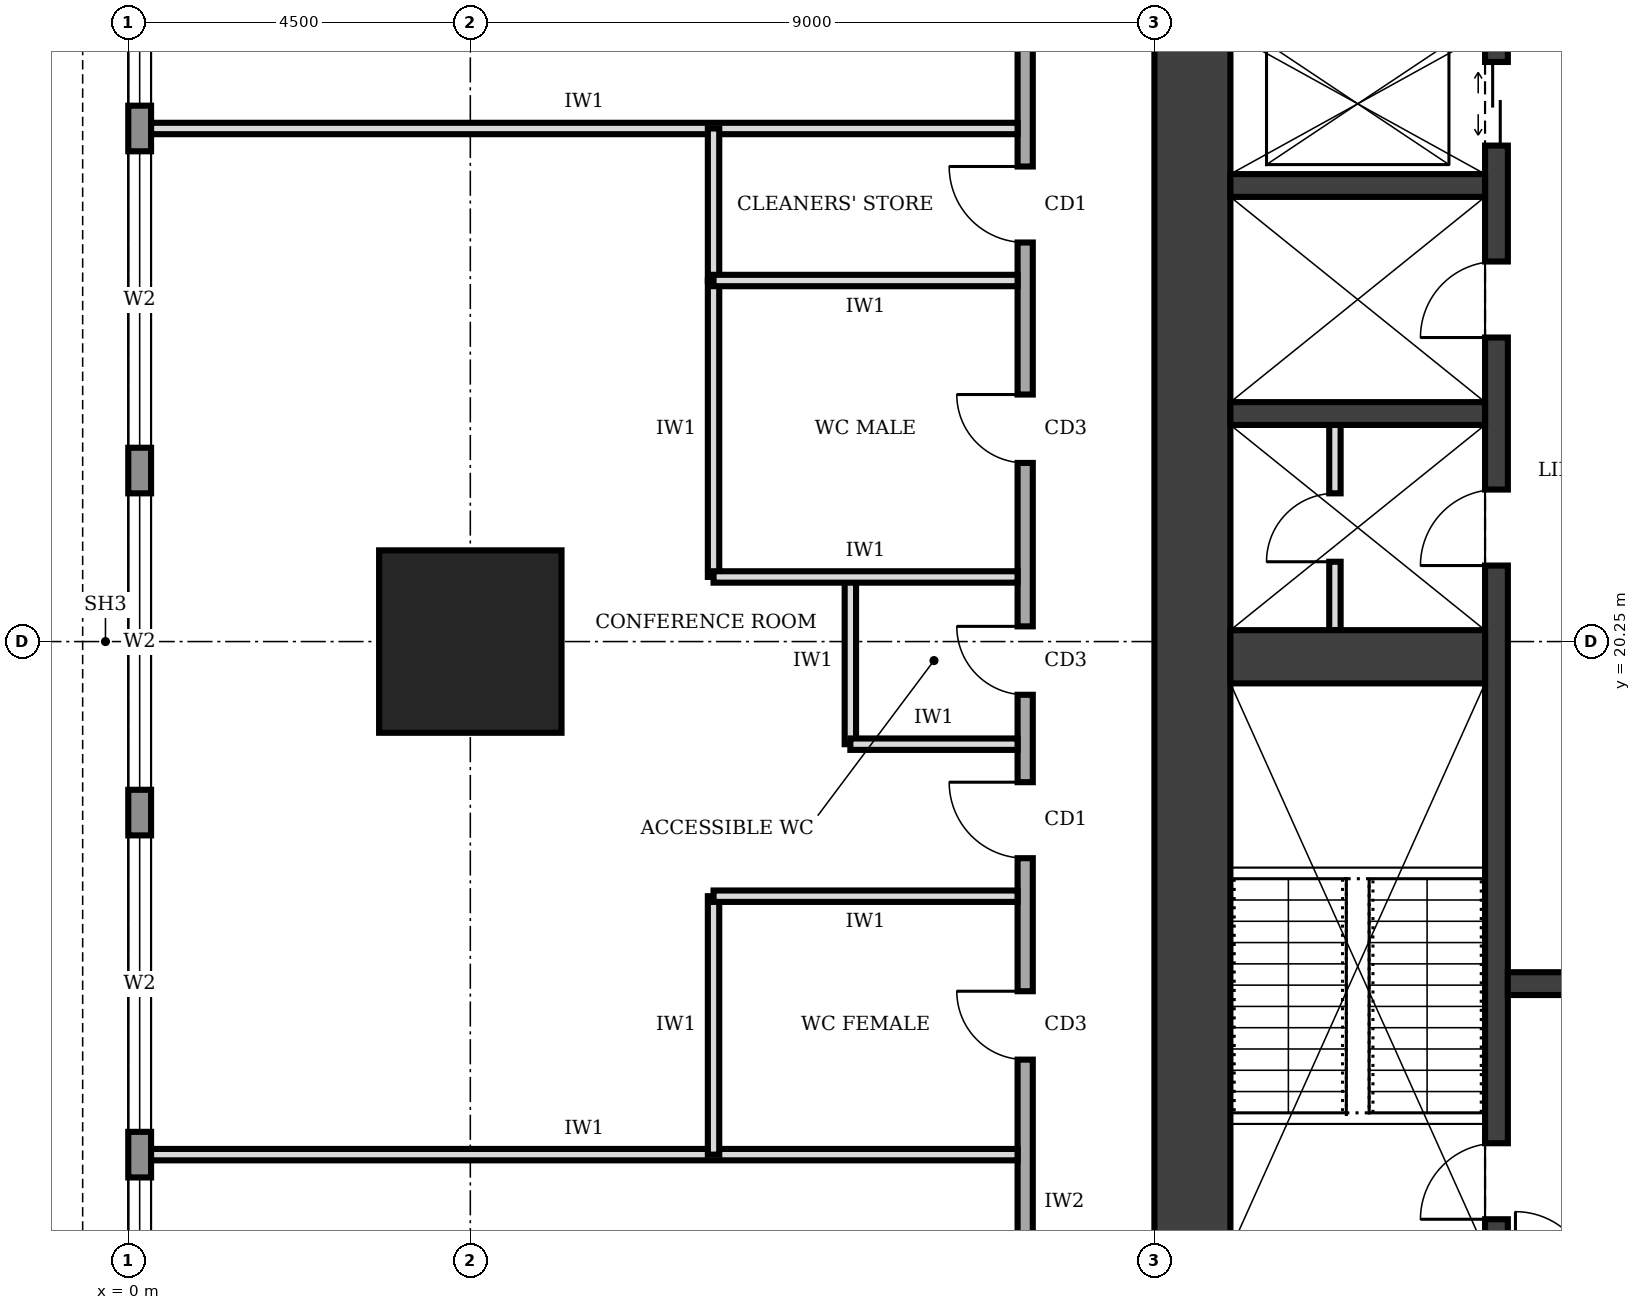
"""IFC4 building model, lengths in metres.
Left out: names, types, materials, properties, quantities, classifications, styles, units other than length and angle.
Written with IfcOpenShell. Run it as: python <this file> out.ifc"""

import sys

from ifc_helpers import new_model, si_unit, direction, frame, frame_2d, origin, origin_2d, place, context, subcontext, project, spatial, rectangle, extrude, element, fill, save


model = new_model("IFC4")
c1 = context("Model", 3, precision=1e-05, world=origin(), true_north=direction((0.0, 1.0)))
c2 = subcontext(c1, "Body", "Model", "MODEL_VIEW")
j1 = project(units=[si_unit("LENGTHUNIT", "METRE"), si_unit("PLANEANGLEUNIT", "RADIAN")], contexts=[c1])
p1 = place(None, origin())
s1 = spatial("IfcSite", under=j1, at=p1, CompositionType="ELEMENT")
p2 = place(p1, origin())
s2 = spatial("IfcBuilding", under=s1, at=p2, CompositionType="ELEMENT")
p3 = place(p2, frame((0.0, 0.0, 149.0)))
s3 = spatial("IfcBuildingStorey", under=s2, at=p3, CompositionType="ELEMENT", Elevation=149.0)
p4 = place(p3, frame((14.0, 28.25, 0.0), z_axis=(0.0, 0.0, 1.0), x_axis=(0.0, -1.0, 0.0)))
e1 = element("IfcWall", 1, at=p4, inside=s3, PredefinedType="SHEAR", context=c2, shape_type="SweptSolid", body=[
    extrude(rectangle(XDim=16.0, YDim=1.0, at=frame_2d((8.0, 0.0))), origin(), (0.0, 0.0, 1.0), 4.0),
])
p5 = place(p3, frame((18.0, 12.25, 0.0), z_axis=(0.0, 0.0, 1.0), x_axis=(0.0, 1.0, 0.0)))
e2 = element("IfcWall", 2, at=p5, inside=s3, PredefinedType="SHEAR", context=c2, shape_type="SweptSolid", body=[
    extrude(rectangle(XDim=16.0, YDim=0.3, at=frame_2d((8.0, 0.0))), origin(), (0.0, 0.0, 1.0), 4.0),
])
p6 = place(p5, frame((0.4, 0.0, 0.0)))
e3 = element("IfcOpeningElement", 3, at=p6, cuts=e2, PredefinedType="OPENING", context=c2, shape_type="SweptSolid", body=[
    extrude(rectangle(XDim=1.0, YDim=2.1, at=frame_2d((0.5, 1.05))), frame((0.0, 0.16, 0.0), z_axis=(0.0, -1.0, 0.0), x_axis=(1.0, 0.0, 0.0)), (0.0, 0.0, 1.0), 0.32),
])
p7 = place(p5, frame((14.525, 0.0, 0.0)))
e4 = element("IfcOpeningElement", 4, at=p7, cuts=e2, PredefinedType="OPENING", context=c2, shape_type="SweptSolid", body=[
    extrude(rectangle(XDim=1.1, YDim=2.1, at=frame_2d((0.55, 1.05))), frame((0.0, 0.16, 0.0), z_axis=(0.0, -1.0, 0.0), x_axis=(1.0, 0.0, 0.0)), (0.0, 0.0, 1.0), 0.32),
])
p8 = place(p5, frame((9.0, 0.0, 0.0)))
e5 = element("IfcOpeningElement", 5, at=p8, cuts=e2, PredefinedType="OPENING", context=c2, shape_type="SweptSolid", body=[
    extrude(rectangle(XDim=1.0, YDim=2.1, at=frame_2d((0.5, 1.05))), frame((0.0, 0.16, 0.0), z_axis=(0.0, -1.0, 0.0), x_axis=(1.0, 0.0, 0.0)), (0.0, 0.0, 1.0), 0.32),
])
p9 = place(p5, frame((12.0, 0.0, 0.0)))
e6 = element("IfcOpeningElement", 6, at=p9, cuts=e2, PredefinedType="OPENING", context=c2, shape_type="SweptSolid", body=[
    extrude(rectangle(XDim=1.0, YDim=2.1, at=frame_2d((0.5, 1.05))), frame((0.0, 0.16, 0.0), z_axis=(0.0, -1.0, 0.0), x_axis=(1.0, 0.0, 0.0)), (0.0, 0.0, 1.0), 0.32),
])
p10 = place(p3, frame((14.5, 20.05, 0.0), z_axis=(0.0, 0.0, 1.0), x_axis=(1.0, 0.0, 0.0)))
e7 = element("IfcWall", 7, at=p10, inside=s3, PredefinedType="SHEAR", context=c2, shape_type="SweptSolid", body=[
    extrude(rectangle(XDim=3.35, YDim=0.7, at=frame_2d((1.675, 0.0))), origin(), (0.0, 0.0, 1.0), 4.0),
])
p11 = place(p3, frame((18.15, 15.75, 0.0), z_axis=(0.0, 0.0, 1.0), x_axis=(1.0, 0.0, 0.0)))
e8 = element("IfcWall", 8, at=p11, inside=s3, PredefinedType="SHEAR", context=c2, shape_type="SweptSolid", body=[
    extrude(rectangle(XDim=4.2, YDim=0.3, at=frame_2d((2.1, 0.0))), origin(), (0.0, 0.0, 1.0), 4.0),
])
p12 = place(p11, frame((1.6, 0.0, 0.0)))
e9 = element("IfcOpeningElement", 9, at=p12, cuts=e8, PredefinedType="OPENING", context=c2, shape_type="SweptSolid", body=[
    extrude(rectangle(XDim=1.0, YDim=2.1, at=frame_2d((0.5, 1.05))), frame((0.0, 0.16, 0.0), z_axis=(0.0, -1.0, 0.0), x_axis=(1.0, 0.0, 0.0)), (0.0, 0.0, 1.0), 0.32),
])
for number, where, z_axis, x_axis in (
    (10, (14.5, 23.25, 0.0), (0.0, 0.0, 1.0), (1.0, 0.0, 0.0)),
    (11, (14.5, 26.25, 0.0), (0.0, 0.0, 1.0), (1.0, 0.0, 0.0)),
):
    element("IfcWall", number, at=place(p3, frame(where, z_axis=z_axis, x_axis=x_axis)), inside=s3, PredefinedType="SHEAR", context=c2, shape_type="SweptSolid", body=[
        extrude(rectangle(XDim=3.35, YDim=0.3, at=frame_2d((1.675, 0.0))), origin(), (0.0, 0.0, 1.0), 4.0),
    ])
p13 = place(p3, frame((4.5, 20.25, 0.0), z_axis=(0.0, 0.0, 1.0), x_axis=(1.0, 0.0, 0.0)))
e12 = element("IfcColumn", 12, at=p13, inside=s3, PredefinedType="COLUMN", context=c2, shape_type="SweptSolid", body=[
    extrude(rectangle(XDim=2.4, YDim=2.4, at=origin_2d()), origin(), (0.0, 0.0, 1.0), 4.0),
])
p14 = place(p3, frame((0.15, 35.98, 0.0), z_axis=(0.0, 0.0, 1.0), x_axis=(0.0, -1.0, 0.0)))
e13 = element("IfcWall", 13, at=p14, inside=s3, PredefinedType="STANDARD", context=c2, shape_type="SweptSolid", body=[
    extrude(rectangle(XDim=31.46, YDim=0.3, at=frame_2d((15.73, 0.0))), origin(), (0.0, 0.0, 1.0), 3.75),
])
p15 = place(p14, frame((27.28, 0.0, 0.6)))
e14 = element("IfcOpeningElement", 14, at=p15, cuts=e13, PredefinedType="OPENING", context=c2, shape_type="SweptSolid", body=[
    extrude(rectangle(XDim=3.9, YDim=2.6, at=frame_2d((1.95, 1.3))), frame((0.0, 0.16, 0.0), z_axis=(0.0, -1.0, 0.0), x_axis=(1.0, 0.0, 0.0)), (0.0, 0.0, 1.0), 0.32),
])
p16 = place(p14, frame((22.78, 0.0, 0.6)))
e15 = element("IfcOpeningElement", 15, at=p16, cuts=e13, PredefinedType="OPENING", context=c2, shape_type="SweptSolid", body=[
    extrude(rectangle(XDim=3.9, YDim=2.6, at=frame_2d((1.95, 1.3))), frame((0.0, 0.16, 0.0), z_axis=(0.0, -1.0, 0.0), x_axis=(1.0, 0.0, 0.0)), (0.0, 0.0, 1.0), 0.32),
])
p17 = place(p14, frame((18.28, 0.0, 0.6)))
e16 = element("IfcOpeningElement", 16, at=p17, cuts=e13, PredefinedType="OPENING", context=c2, shape_type="SweptSolid", body=[
    extrude(rectangle(XDim=3.9, YDim=2.6, at=frame_2d((1.95, 1.3))), frame((0.0, 0.16, 0.0), z_axis=(0.0, -1.0, 0.0), x_axis=(1.0, 0.0, 0.0)), (0.0, 0.0, 1.0), 0.32),
])
p18 = place(p14, frame((13.78, 0.0, 0.6)))
e17 = element("IfcOpeningElement", 17, at=p18, cuts=e13, PredefinedType="OPENING", context=c2, shape_type="SweptSolid", body=[
    extrude(rectangle(XDim=3.9, YDim=2.6, at=frame_2d((1.95, 1.3))), frame((0.0, 0.16, 0.0), z_axis=(0.0, -1.0, 0.0), x_axis=(1.0, 0.0, 0.0)), (0.0, 0.0, 1.0), 0.32),
])
p19 = place(p14, frame((9.28, 0.0, 0.6)))
e18 = element("IfcOpeningElement", 18, at=p19, cuts=e13, PredefinedType="OPENING", context=c2, shape_type="SweptSolid", body=[
    extrude(rectangle(XDim=3.9, YDim=2.6, at=frame_2d((1.95, 1.3))), frame((0.0, 0.16, 0.0), z_axis=(0.0, -1.0, 0.0), x_axis=(1.0, 0.0, 0.0)), (0.0, 0.0, 1.0), 0.32),
])
p20 = place(p14, frame((4.78, 0.0, 0.6)))
e19 = element("IfcOpeningElement", 19, at=p20, cuts=e13, PredefinedType="OPENING", context=c2, shape_type="SweptSolid", body=[
    extrude(rectangle(XDim=3.9, YDim=2.6, at=frame_2d((1.95, 1.3))), frame((0.0, 0.16, 0.0), z_axis=(0.0, -1.0, 0.0), x_axis=(1.0, 0.0, 0.0)), (0.0, 0.0, 1.0), 0.32),
])
p21 = place(p3, frame((15.875, 20.4, 0.0), z_axis=(0.0, 0.0, 1.0), x_axis=(0.0, 1.0, 0.0)))
e20 = element("IfcWall", 20, at=p21, inside=s3, PredefinedType="PARTITIONING", context=c2, shape_type="SweptSolid", body=[
    extrude(rectangle(XDim=2.7, YDim=0.15, at=frame_2d((1.35, 0.0))), origin(), (0.0, 0.0, 1.0), 3.75),
])
p22 = place(p21, frame((0.9, 0.0, 0.0)))
e21 = element("IfcOpeningElement", 21, at=p22, cuts=e20, PredefinedType="OPENING", context=c2, shape_type="SweptSolid", body=[
    extrude(rectangle(XDim=0.9, YDim=2.1, at=frame_2d((0.45, 1.05))), frame((0.0, 0.085, 0.0), z_axis=(0.0, -1.0, 0.0), x_axis=(1.0, 0.0, 0.0)), (0.0, 0.0, 1.0), 0.17),
])
p23 = place(p3, frame((11.8, 32.8, 0.0), z_axis=(0.0, 0.0, 1.0), x_axis=(0.0, -1.0, 0.0)))
e22 = element("IfcWall", 22, at=p23, inside=s3, PredefinedType="SOLIDWALL", context=c2, shape_type="SweptSolid", body=[
    extrude(rectangle(XDim=25.3, YDim=0.2, at=frame_2d((12.65, 0.0))), origin(), (0.0, 0.0, 1.0), 3.75),
])
p24 = place(p23, frame((21.8, 0.0, 0.0)))
e23 = element("IfcOpeningElement", 23, at=p24, cuts=e22, PredefinedType="OPENING", context=c2, shape_type="SweptSolid", body=[
    extrude(rectangle(XDim=1.0, YDim=2.1, at=frame_2d((0.5, 1.05))), frame((0.0, 0.11, 0.0), z_axis=(0.0, -1.0, 0.0), x_axis=(1.0, 0.0, 0.0)), (0.0, 0.0, 1.0), 0.22),
])
p25 = place(p23, frame((17.15, 0.0, 0.0)))
e24 = element("IfcOpeningElement", 24, at=p25, cuts=e22, PredefinedType="OPENING", context=c2, shape_type="SweptSolid", body=[
    extrude(rectangle(XDim=0.9, YDim=2.1, at=frame_2d((0.45, 1.05))), frame((0.0, 0.11, 0.0), z_axis=(0.0, -1.0, 0.0), x_axis=(1.0, 0.0, 0.0)), (0.0, 0.0, 1.0), 0.22),
])
p26 = place(p23, frame((12.35, 0.0, 0.0)))
e25 = element("IfcOpeningElement", 25, at=p26, cuts=e22, PredefinedType="OPENING", context=c2, shape_type="SweptSolid", body=[
    extrude(rectangle(XDim=0.9, YDim=2.1, at=frame_2d((0.45, 1.05))), frame((0.0, 0.11, 0.0), z_axis=(0.0, -1.0, 0.0), x_axis=(1.0, 0.0, 0.0)), (0.0, 0.0, 1.0), 0.22),
])
p27 = place(p23, frame((9.3, 0.0, 0.0)))
e26 = element("IfcOpeningElement", 26, at=p27, cuts=e22, PredefinedType="OPENING", context=c2, shape_type="SweptSolid", body=[
    extrude(rectangle(XDim=0.9, YDim=2.1, at=frame_2d((0.45, 1.05))), frame((0.0, 0.11, 0.0), z_axis=(0.0, -1.0, 0.0), x_axis=(1.0, 0.0, 0.0)), (0.0, 0.0, 1.0), 0.22),
])
p28 = place(p23, frame((6.3, 0.0, 0.0)))
e27 = element("IfcOpeningElement", 27, at=p28, cuts=e22, PredefinedType="OPENING", context=c2, shape_type="SweptSolid", body=[
    extrude(rectangle(XDim=1.0, YDim=2.1, at=frame_2d((0.5, 1.05))), frame((0.0, 0.11, 0.0), z_axis=(0.0, -1.0, 0.0), x_axis=(1.0, 0.0, 0.0)), (0.0, 0.0, 1.0), 0.22),
])
p29 = place(p23, frame((14.4, 0.0, 0.0)))
e28 = element("IfcOpeningElement", 28, at=p29, cuts=e22, PredefinedType="OPENING", context=c2, shape_type="SweptSolid", body=[
    extrude(rectangle(XDim=1.0, YDim=2.1, at=frame_2d((0.5, 1.05))), frame((0.0, 0.11, 0.0), z_axis=(0.0, -1.0, 0.0), x_axis=(1.0, 0.0, 0.0)), (0.0, 0.0, 1.0), 0.22),
])
p30 = place(p23, frame((2.3, 0.0, 0.0)))
e29 = element("IfcOpeningElement", 29, at=p30, cuts=e22, PredefinedType="OPENING", context=c2, shape_type="SweptSolid", body=[
    extrude(rectangle(XDim=1.0, YDim=2.1, at=frame_2d((0.5, 1.05))), frame((0.0, 0.11, 0.0), z_axis=(0.0, -1.0, 0.0), x_axis=(1.0, 0.0, 0.0)), (0.0, 0.0, 1.0), 0.22),
])
for number, where, z_axis, x_axis in (
    (30, (0.3, 13.5, 0.0), (0.0, 0.0, 1.0), (1.0, 0.0, 0.0)),
    (31, (0.3, 27.0, 0.0), (0.0, 0.0, 1.0), (1.0, 0.0, 0.0)),
):
    element("IfcWall", number, at=place(p3, frame(where, z_axis=z_axis, x_axis=x_axis)), inside=s3, PredefinedType="PARTITIONING", context=c2, shape_type="SweptSolid", body=[
        extrude(rectangle(XDim=11.4, YDim=0.15, at=frame_2d((5.7, 0.0))), origin(), (0.0, 0.0, 1.0), 3.75),
    ])
p31 = place(p3, frame((11.7, 16.9, 0.0), z_axis=(0.0, 0.0, 1.0), x_axis=(-1.0, 0.0, 0.0)))
e32 = element("IfcWall", 32, at=p31, inside=s3, PredefinedType="PARTITIONING", context=c2, shape_type="SweptSolid", body=[
    extrude(rectangle(XDim=4.0, YDim=0.15, at=frame_2d((2.0, 0.0))), origin(), (0.0, 0.0, 1.0), 3.75),
])
p32 = place(p3, frame((11.7, 18.9, 0.0), z_axis=(0.0, 0.0, 1.0), x_axis=(-1.0, 0.0, 0.0)))
e33 = element("IfcWall", 33, at=p32, inside=s3, PredefinedType="PARTITIONING", context=c2, shape_type="SweptSolid", body=[
    extrude(rectangle(XDim=2.2, YDim=0.15, at=frame_2d((1.1, 0.0))), origin(), (0.0, 0.0, 1.0), 3.75),
])
p33 = place(p3, frame((11.7, 21.1, 0.0), z_axis=(0.0, 0.0, 1.0), x_axis=(-1.0, 0.0, 0.0)))
e34 = element("IfcWall", 34, at=p33, inside=s3, PredefinedType="PARTITIONING", context=c2, shape_type="SweptSolid", body=[
    extrude(rectangle(XDim=4.0, YDim=0.15, at=frame_2d((2.0, 0.0))), origin(), (0.0, 0.0, 1.0), 2.85),
])
p34 = place(p3, frame((11.7, 25.0, 0.0), z_axis=(0.0, 0.0, 1.0), x_axis=(-1.0, 0.0, 0.0)))
e35 = element("IfcWall", 35, at=p34, inside=s3, PredefinedType="PARTITIONING", context=c2, shape_type="SweptSolid", body=[
    extrude(rectangle(XDim=4.0, YDim=0.15, at=frame_2d((2.0, 0.0))), origin(), (0.0, 0.0, 1.0), 3.75),
])
p35 = place(p3, frame((7.7, 13.5, 0.0), z_axis=(0.0, 0.0, 1.0), x_axis=(0.0, 1.0, 0.0)))
e36 = element("IfcWall", 36, at=p35, inside=s3, PredefinedType="PARTITIONING", context=c2, shape_type="SweptSolid", body=[
    extrude(rectangle(XDim=3.4, YDim=0.15, at=frame_2d((1.7, 0.0))), origin(), (0.0, 0.0, 1.0), 3.75),
])
p36 = place(p3, frame((9.5, 18.9, 0.0), z_axis=(0.0, 0.0, 1.0), x_axis=(0.0, 1.0, 0.0)))
e37 = element("IfcWall", 37, at=p36, inside=s3, PredefinedType="PARTITIONING", context=c2, shape_type="SweptSolid", body=[
    extrude(rectangle(XDim=2.2, YDim=0.15, at=frame_2d((1.1, 0.0))), origin(), (0.0, 0.0, 1.0), 3.75),
])
p37 = place(p3, frame((7.7, 21.1, 0.0), z_axis=(0.0, 0.0, 1.0), x_axis=(0.0, 1.0, 0.0)))
e38 = element("IfcWall", 38, at=p37, inside=s3, PredefinedType="PARTITIONING", context=c2, shape_type="SweptSolid", body=[
    extrude(rectangle(XDim=3.9, YDim=0.15, at=frame_2d((1.95, 0.0))), origin(), (0.0, 0.0, 1.0), 3.75),
])
p38 = place(p3, frame((7.7, 25.0, 0.0), z_axis=(0.0, 0.0, 1.0), x_axis=(0.0, 1.0, 0.0)))
e39 = element("IfcWall", 39, at=p38, inside=s3, PredefinedType="PARTITIONING", context=c2, shape_type="SweptSolid", body=[
    extrude(rectangle(XDim=2.0, YDim=0.15, at=frame_2d((1.0, 0.0))), origin(), (0.0, 0.0, 1.0), 3.75),
])
p39 = place(p16, origin())
e40 = element("IfcWindow", 40, at=p39, inside=s3, PartitioningType="SINGLE_PANEL", PredefinedType="WINDOW", context=c2, shape_type="SweptSolid", body=[
    extrude(rectangle(XDim=3.9, YDim=2.6, at=frame_2d((1.95, 1.3))), frame((0.0, 0.03, 0.0), z_axis=(0.0, -1.0, 0.0), x_axis=(1.0, 0.0, 0.0)), (0.0, 0.0, 1.0), 0.06),
])
fill(e15, e40)
p40 = place(p17, origin())
e41 = element("IfcWindow", 41, at=p40, inside=s3, PartitioningType="SINGLE_PANEL", PredefinedType="WINDOW", context=c2, shape_type="SweptSolid", body=[
    extrude(rectangle(XDim=3.9, YDim=2.6, at=frame_2d((1.95, 1.3))), frame((0.0, 0.03, 0.0), z_axis=(0.0, -1.0, 0.0), x_axis=(1.0, 0.0, 0.0)), (0.0, 0.0, 1.0), 0.06),
])
fill(e16, e41)
p41 = place(p18, origin())
e42 = element("IfcWindow", 42, at=p41, inside=s3, PartitioningType="SINGLE_PANEL", PredefinedType="WINDOW", context=c2, shape_type="SweptSolid", body=[
    extrude(rectangle(XDim=3.9, YDim=2.6, at=frame_2d((1.95, 1.3))), frame((0.0, 0.03, 0.0), z_axis=(0.0, -1.0, 0.0), x_axis=(1.0, 0.0, 0.0)), (0.0, 0.0, 1.0), 0.06),
])
fill(e17, e42)
p42 = place(p19, origin())
e43 = element("IfcWindow", 43, at=p42, inside=s3, PartitioningType="SINGLE_PANEL", PredefinedType="WINDOW", context=c2, shape_type="SweptSolid", body=[
    extrude(rectangle(XDim=3.9, YDim=2.6, at=frame_2d((1.95, 1.3))), frame((0.0, 0.03, 0.0), z_axis=(0.0, -1.0, 0.0), x_axis=(1.0, 0.0, 0.0)), (0.0, 0.0, 1.0), 0.06),
])
fill(e18, e43)
p43 = place(p20, origin())
e44 = element("IfcWindow", 44, at=p43, inside=s3, PartitioningType="SINGLE_PANEL", PredefinedType="WINDOW", context=c2, shape_type="SweptSolid", body=[
    extrude(rectangle(XDim=3.9, YDim=2.6, at=frame_2d((1.95, 1.3))), frame((0.0, 0.03, 0.0), z_axis=(0.0, -1.0, 0.0), x_axis=(1.0, 0.0, 0.0)), (0.0, 0.0, 1.0), 0.06),
])
fill(e19, e44)
p44 = place(p6, origin())
e45 = element("IfcDoor", 45, at=p44, inside=s3, OperationType="SINGLE_SWING_LEFT", PredefinedType="DOOR", context=c2, shape_type="SweptSolid", body=[
    extrude(rectangle(XDim=1.0, YDim=2.1, at=frame_2d((0.5, 1.05))), frame((0.0, 0.025, 0.0), z_axis=(0.0, -1.0, 0.0), x_axis=(1.0, 0.0, 0.0)), (0.0, 0.0, 1.0), 0.05),
])
fill(e3, e45)
p45 = place(p7, origin())
e46 = element("IfcDoor", 46, at=p45, inside=s3, OperationType="DOUBLE_DOOR_SLIDING", PredefinedType="DOOR", context=c2, shape_type="SweptSolid", body=[
    extrude(rectangle(XDim=1.1, YDim=2.1, at=frame_2d((0.55, 1.05))), frame((0.0, 0.025, 0.0), z_axis=(0.0, -1.0, 0.0), x_axis=(1.0, 0.0, 0.0)), (0.0, 0.0, 1.0), 0.05),
])
fill(e4, e46)
p46 = place(p8, origin())
e47 = element("IfcDoor", 47, at=p46, inside=s3, OperationType="SINGLE_SWING_LEFT", PredefinedType="DOOR", context=c2, shape_type="SweptSolid", body=[
    extrude(rectangle(XDim=1.0, YDim=2.1, at=frame_2d((0.5, 1.05))), frame((0.0, 0.025, 0.0), z_axis=(0.0, -1.0, 0.0), x_axis=(1.0, 0.0, 0.0)), (0.0, 0.0, 1.0), 0.05),
])
fill(e5, e47)
p47 = place(p22, origin())
e48 = element("IfcDoor", 48, at=p47, inside=s3, OperationType="SINGLE_SWING_LEFT", PredefinedType="DOOR", context=c2, shape_type="SweptSolid", body=[
    extrude(rectangle(XDim=0.9, YDim=2.1, at=frame_2d((0.45, 1.05))), frame((0.0, 0.025, 0.0), z_axis=(0.0, -1.0, 0.0), x_axis=(1.0, 0.0, 0.0)), (0.0, 0.0, 1.0), 0.05),
])
fill(e21, e48)
p48 = place(p9, origin())
e49 = element("IfcDoor", 49, at=p48, inside=s3, OperationType="SINGLE_SWING_LEFT", PredefinedType="DOOR", context=c2, shape_type="SweptSolid", body=[
    extrude(rectangle(XDim=1.0, YDim=2.1, at=frame_2d((0.5, 1.05))), frame((0.0, 0.025, 0.0), z_axis=(0.0, -1.0, 0.0), x_axis=(1.0, 0.0, 0.0)), (0.0, 0.0, 1.0), 0.05),
])
fill(e6, e49)
p49 = place(p25, frame((0.9, 0.0, 0.0), z_axis=(0.0, 0.0, 1.0), x_axis=(-1.0, 0.0, 0.0)))
e50 = element("IfcDoor", 50, at=p49, inside=s3, OperationType="SINGLE_SWING_RIGHT", PredefinedType="DOOR", context=c2, shape_type="SweptSolid", body=[
    extrude(rectangle(XDim=0.9, YDim=2.1, at=frame_2d((0.45, 1.05))), frame((0.0, 0.025, 0.0), z_axis=(0.0, -1.0, 0.0), x_axis=(1.0, 0.0, 0.0)), (0.0, 0.0, 1.0), 0.05),
])
fill(e24, e50)
p50 = place(p26, frame((0.9, 0.0, 0.0), z_axis=(0.0, 0.0, 1.0), x_axis=(-1.0, 0.0, 0.0)))
e51 = element("IfcDoor", 51, at=p50, inside=s3, OperationType="SINGLE_SWING_RIGHT", PredefinedType="DOOR", context=c2, shape_type="SweptSolid", body=[
    extrude(rectangle(XDim=0.9, YDim=2.1, at=frame_2d((0.45, 1.05))), frame((0.0, 0.025, 0.0), z_axis=(0.0, -1.0, 0.0), x_axis=(1.0, 0.0, 0.0)), (0.0, 0.0, 1.0), 0.05),
])
fill(e25, e51)
p51 = place(p27, frame((0.9, 0.0, 0.0), z_axis=(0.0, 0.0, 1.0), x_axis=(-1.0, 0.0, 0.0)))
e52 = element("IfcDoor", 52, at=p51, inside=s3, OperationType="SINGLE_SWING_RIGHT", PredefinedType="DOOR", context=c2, shape_type="SweptSolid", body=[
    extrude(rectangle(XDim=0.9, YDim=2.1, at=frame_2d((0.45, 1.05))), frame((0.0, 0.025, 0.0), z_axis=(0.0, -1.0, 0.0), x_axis=(1.0, 0.0, 0.0)), (0.0, 0.0, 1.0), 0.05),
])
fill(e26, e52)
p52 = place(p28, frame((1.0, 0.0, 0.0), z_axis=(0.0, 0.0, 1.0), x_axis=(-1.0, 0.0, 0.0)))
e53 = element("IfcDoor", 53, at=p52, inside=s3, OperationType="SINGLE_SWING_RIGHT", PredefinedType="DOOR", context=c2, shape_type="SweptSolid", body=[
    extrude(rectangle(XDim=1.0, YDim=2.1, at=frame_2d((0.5, 1.05))), frame((0.0, 0.025, 0.0), z_axis=(0.0, -1.0, 0.0), x_axis=(1.0, 0.0, 0.0)), (0.0, 0.0, 1.0), 0.05),
])
fill(e27, e53)
p53 = place(p29, frame((1.0, 0.0, 0.0), z_axis=(0.0, 0.0, 1.0), x_axis=(-1.0, 0.0, 0.0)))
e54 = element("IfcDoor", 54, at=p53, inside=s3, OperationType="SINGLE_SWING_RIGHT", PredefinedType="DOOR", context=c2, shape_type="SweptSolid", body=[
    extrude(rectangle(XDim=1.0, YDim=2.1, at=frame_2d((0.5, 1.05))), frame((0.0, 0.025, 0.0), z_axis=(0.0, -1.0, 0.0), x_axis=(1.0, 0.0, 0.0)), (0.0, 0.0, 1.0), 0.05),
])
fill(e28, e54)
save(model, sys.argv[1])
